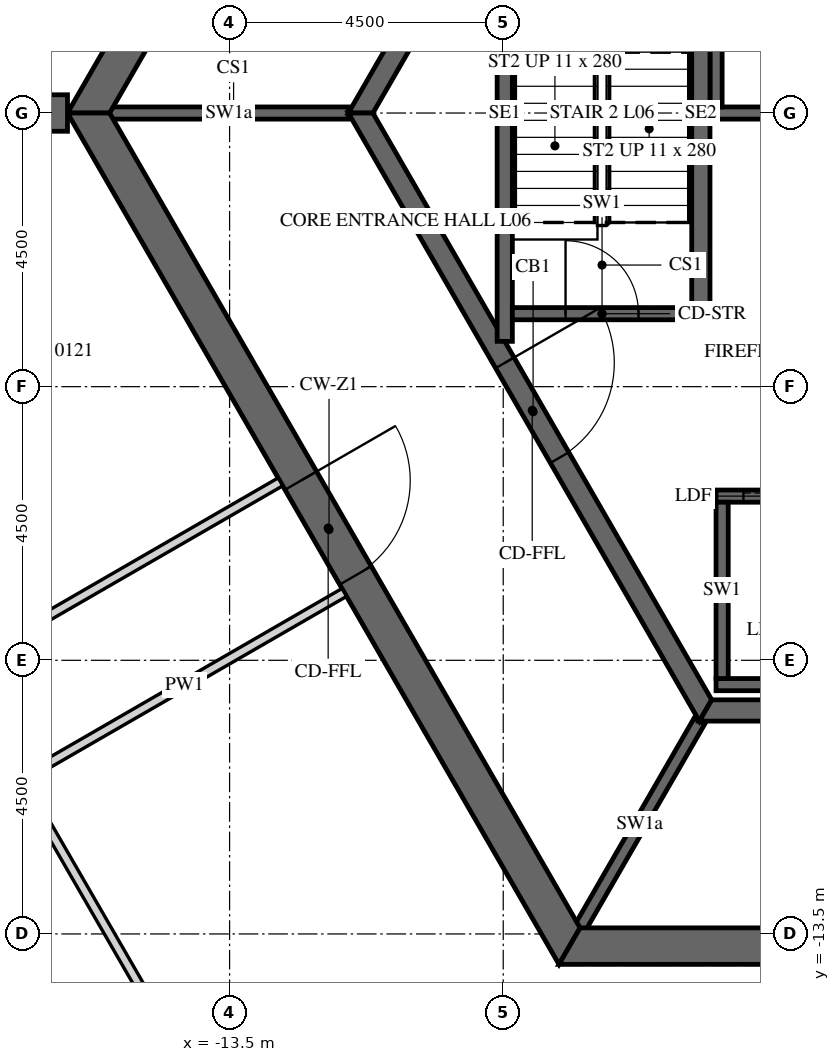
"""IFC4 building model, lengths in metres.
Left out: names, types, materials, properties, quantities, classifications, styles, units other than length and angle.
Written with IfcOpenShell. Run it as: python <this file> out.ifc"""

import sys

from ifc_helpers import new_model, si_unit, direction, frame, frame_2d, origin, place, context, subcontext, project, spatial, polyline, rectangle, outline, extrude, element, fill, save


model = new_model("IFC4")
c1 = context("Model", 3, precision=1e-05, world=origin(), true_north=direction((0.0, 1.0)))
c2 = subcontext(c1, "Body", "Model", "MODEL_VIEW")
j1 = project(units=[si_unit("LENGTHUNIT", "METRE"), si_unit("PLANEANGLEUNIT", "RADIAN")], contexts=[c1])
p1 = place(None, origin())
s1 = spatial("IfcSite", under=j1, at=p1, CompositionType="ELEMENT")
p2 = place(p1, origin())
s2 = spatial("IfcBuilding", under=s1, at=p2, CompositionType="ELEMENT")
p3 = place(p2, frame((0.0, 0.0, 37.5)))
s3 = spatial("IfcBuildingStorey", under=s2, at=p3, CompositionType="ELEMENT", Elevation=37.5)
p4 = place(p3, frame((-7.91, 13.7, -0.15), z_axis=(0.0, 0.0, 1.0), x_axis=(-0.499999880136, -0.866025472988, 0.0)))
e1 = element("IfcWall", 1, at=p4, inside=s3, PredefinedType="SHEAR", context=c2, shape_type="SweptSolid", body=[
    extrude(outline(polyline([(-0.173, -0.3), (15.993, -0.3), (15.646, 0.3), (0.173, 0.3), (-0.173, -0.3)])), origin(), (0.0, 0.0, 1.0), 3.9),
])
p5 = place(p4, frame((7.039, 0.0, 0.15)))
e2 = element("IfcOpeningElement", 2, at=p5, cuts=e1, PredefinedType="OPENING", context=c2, shape_type="SweptSolid", body=[
    extrude(rectangle(XDim=1.8, YDim=2.4, at=frame_2d((0.9, 1.2))), frame((0.0, 0.31, 0.0), z_axis=(0.0, -1.0, 0.0), x_axis=(1.0, 0.0, 0.0)), (0.0, 0.0, 1.0), 0.62),
])
p6 = place(p3, frame((-15.819, 0.0, -0.15), z_axis=(0.0, 0.0, 1.0), x_axis=(0.499999880136, -0.866025472988, 0.0)))
e3 = element("IfcWall", 3, at=p6, inside=s3, PredefinedType="SHEAR", context=c2, shape_type="SweptSolid", body=[
    extrude(outline(polyline([(-0.173, -0.3), (15.993, -0.3), (15.646, 0.3), (0.173, 0.3), (-0.173, -0.3)])), origin(), (0.0, 0.0, 1.0), 3.9),
])
p7 = place(p6, frame((6.981, 0.0, 0.15)))
e4 = element("IfcOpeningElement", 4, at=p7, cuts=e3, PredefinedType="OPENING", context=c2, shape_type="SweptSolid", body=[
    extrude(rectangle(XDim=1.8, YDim=2.4, at=frame_2d((0.9, 1.2))), frame((0.0, 0.31, 0.0), z_axis=(0.0, -1.0, 0.0), x_axis=(1.0, 0.0, 0.0)), (0.0, 0.0, 1.0), 0.62),
])
p8 = place(p3, frame((-7.91, -13.7, -0.15), z_axis=(0.0, 0.0, 1.0), x_axis=(1.0, 0.0, 0.0)))
e5 = element("IfcWall", 5, at=p8, inside=s3, PredefinedType="SHEAR", context=c2, shape_type="SweptSolid", body=[
    extrude(outline(polyline([(-0.173, -0.3), (15.993, -0.3), (15.646, 0.3), (0.173, 0.3), (-0.173, -0.3)])), origin(), (0.0, 0.0, 1.0), 3.9),
])
p9 = place(p8, frame((7.31, 0.0, 0.15)))
e6 = element("IfcOpeningElement", 6, at=p9, cuts=e5, PredefinedType="OPENING", context=c2, shape_type="SweptSolid", body=[
    extrude(rectangle(XDim=1.2, YDim=2.4, at=frame_2d((0.6, 1.2))), frame((0.0, 0.31, 0.0), z_axis=(0.0, -1.0, 0.0), x_axis=(1.0, 0.0, 0.0)), (0.0, 0.0, 1.0), 0.62),
])
p10 = place(p3, frame((-16.166, 0.0, -0.15), z_axis=(0.0, 0.0, 1.0), x_axis=(-1.0, 0.0, 0.0)))
e7 = element("IfcWall", 7, at=p10, inside=s3, PredefinedType="SHEAR", context=c2, shape_type="SweptSolid", body=[
    extrude(rectangle(XDim=16.509, YDim=0.6, at=frame_2d((8.254, 0.0))), origin(), (0.0, 0.0, 1.0), 3.9),
])
p11 = place(p10, frame((7.354, 0.0, 0.15)))
e8 = element("IfcOpeningElement", 8, at=p11, cuts=e7, PredefinedType="OPENING", context=c2, shape_type="SweptSolid", body=[
    extrude(rectangle(XDim=1.8, YDim=2.4, at=frame_2d((0.9, 1.2))), frame((0.0, 0.31, 0.0), z_axis=(0.0, -1.0, 0.0), x_axis=(1.0, 0.0, 0.0)), (0.0, 0.0, 1.0), 0.62),
])
p12 = place(p3, frame((-5.673, 9.825, -0.15), z_axis=(0.0, 0.0, 1.0), x_axis=(-0.499995046907, -0.866028263435, 0.0)))
e9 = element("IfcWall", 9, at=p12, inside=s3, PredefinedType="SHEAR", context=c2, shape_type="SweptSolid", body=[
    extrude(outline(polyline([(-0.101, -0.175), (11.446, -0.175), (11.244, 0.175), (0.101, 0.175), (-0.101, -0.175)])), origin(), (0.0, 0.0, 1.0), 3.9),
])
p13 = place(p12, frame((4.801, 0.0, 0.15)))
e10 = element("IfcOpeningElement", 10, at=p13, cuts=e9, PredefinedType="OPENING", context=c2, shape_type="SweptSolid", body=[
    extrude(rectangle(XDim=1.8, YDim=2.4, at=frame_2d((0.9, 1.2))), frame((0.0, 0.185, 0.0), z_axis=(0.0, -1.0, 0.0), x_axis=(1.0, 0.0, 0.0)), (0.0, 0.0, 1.0), 0.37),
])
p14 = place(p3, frame((-11.345, 0.0, -0.15), z_axis=(0.0, 0.0, 1.0), x_axis=(0.499995046907, -0.866028263435, 0.0)))
e11 = element("IfcWall", 11, at=p14, inside=s3, PredefinedType="SHEAR", context=c2, shape_type="SweptSolid", body=[
    extrude(outline(polyline([(-0.101, -0.175), (11.446, -0.175), (11.244, 0.175), (0.101, 0.175), (-0.101, -0.175)])), origin(), (0.0, 0.0, 1.0), 3.9),
])
p15 = place(p14, frame((4.744, 0.0, 0.15)))
e12 = element("IfcOpeningElement", 12, at=p15, cuts=e11, PredefinedType="OPENING", context=c2, shape_type="SweptSolid", body=[
    extrude(rectangle(XDim=1.8, YDim=2.4, at=frame_2d((0.9, 1.2))), frame((0.0, 0.185, 0.0), z_axis=(0.0, -1.0, 0.0), x_axis=(1.0, 0.0, 0.0)), (0.0, 0.0, 1.0), 0.37),
])
p16 = place(p3, frame((-5.673, -9.825, -0.15), z_axis=(0.0, 0.0, 1.0), x_axis=(1.0, 0.0, 0.0)))
e13 = element("IfcWall", 13, at=p16, inside=s3, PredefinedType="SHEAR", context=c2, shape_type="SweptSolid", body=[
    extrude(outline(polyline([(-0.101, -0.175), (11.446, -0.175), (11.244, 0.175), (0.101, 0.175), (-0.101, -0.175)])), origin(), (0.0, 0.0, 1.0), 3.9),
])
p17 = place(p3, frame((-5.6, 0.0, -0.25), z_axis=(0.0, 0.0, 1.0), x_axis=(1.0, 0.0, 0.0)))
e14 = element("IfcWall", 14, at=p17, inside=s3, PredefinedType="SHEAR", context=c2, shape_type="SweptSolid", body=[
    extrude(rectangle(XDim=11.2, YDim=0.2, at=frame_2d((5.6, 0.0))), origin(), (0.0, 0.0, 1.0), 3.9),
])
p18 = place(p3, frame((-5.5, 0.1, -0.25), z_axis=(0.0, 0.0, 1.0), x_axis=(0.0, 1.0, 0.0)))
e15 = element("IfcWall", 15, at=p18, inside=s3, PredefinedType="SHEAR", context=c2, shape_type="SweptSolid", body=[
    extrude(rectangle(XDim=3.1, YDim=0.2, at=frame_2d((1.55, 0.0))), origin(), (0.0, 0.0, 1.0), 3.9),
])
p19 = place(p3, frame((-5.5, -6.3, -0.25), z_axis=(0.0, 0.0, 1.0), x_axis=(1.0, 0.0, 0.0)))
e16 = element("IfcWall", 16, at=p19, inside=s3, PredefinedType="SHEAR", context=c2, shape_type="SweptSolid", body=[
    extrude(rectangle(XDim=9.2, YDim=0.2, at=frame_2d((4.6, 0.0))), origin(), (0.0, 0.0, 1.0), 3.9),
])
p20 = place(p19, frame((0.45, 0.0, 0.25)))
e17 = element("IfcOpeningElement", 17, at=p20, cuts=e16, PredefinedType="OPENING", context=c2, shape_type="SweptSolid", body=[
    extrude(rectangle(XDim=1.1, YDim=2.1, at=frame_2d((0.55, 1.05))), frame((0.0, 0.11, 0.0), z_axis=(0.0, -1.0, 0.0), x_axis=(1.0, 0.0, 0.0)), (0.0, 0.0, 1.0), 0.22),
])
p21 = place(p19, frame((2.25, 0.0, 0.25)))
e18 = element("IfcOpeningElement", 18, at=p21, cuts=e16, PredefinedType="OPENING", context=c2, shape_type="SweptSolid", body=[
    extrude(rectangle(XDim=1.1, YDim=2.1, at=frame_2d((0.55, 1.05))), frame((0.0, 0.11, 0.0), z_axis=(0.0, -1.0, 0.0), x_axis=(1.0, 0.0, 0.0)), (0.0, 0.0, 1.0), 0.22),
])
p22 = place(p19, frame((4.05, 0.0, 0.25)))
e19 = element("IfcOpeningElement", 19, at=p22, cuts=e16, PredefinedType="OPENING", context=c2, shape_type="SweptSolid", body=[
    extrude(rectangle(XDim=1.1, YDim=2.1, at=frame_2d((0.55, 1.05))), frame((0.0, 0.11, 0.0), z_axis=(0.0, -1.0, 0.0), x_axis=(1.0, 0.0, 0.0)), (0.0, 0.0, 1.0), 0.22),
])
p23 = place(p19, frame((5.85, 0.0, 0.25)))
e20 = element("IfcOpeningElement", 20, at=p23, cuts=e16, PredefinedType="OPENING", context=c2, shape_type="SweptSolid", body=[
    extrude(rectangle(XDim=1.1, YDim=2.1, at=frame_2d((0.55, 1.05))), frame((0.0, 0.11, 0.0), z_axis=(0.0, -1.0, 0.0), x_axis=(1.0, 0.0, 0.0)), (0.0, 0.0, 1.0), 0.22),
])
p24 = place(p19, frame((7.65, 0.0, 0.25)))
e21 = element("IfcOpeningElement", 21, at=p24, cuts=e16, PredefinedType="OPENING", context=c2, shape_type="SweptSolid", body=[
    extrude(rectangle(XDim=1.1, YDim=2.1, at=frame_2d((0.55, 1.05))), frame((0.0, 0.11, 0.0), z_axis=(0.0, -1.0, 0.0), x_axis=(1.0, 0.0, 0.0)), (0.0, 0.0, 1.0), 0.22),
])
p25 = place(p3, frame((-5.5, -9.4, -0.25), z_axis=(0.0, 0.0, 1.0), x_axis=(1.0, 0.0, 0.0)))
e22 = element("IfcWall", 22, at=p25, inside=s3, PredefinedType="SHEAR", context=c2, shape_type="SweptSolid", body=[
    extrude(rectangle(XDim=9.2, YDim=0.2, at=frame_2d((4.6, 0.0))), origin(), (0.0, 0.0, 1.0), 3.9),
])
p26 = place(p3, frame((-5.4, -9.3, -0.25), z_axis=(0.0, 0.0, 1.0), x_axis=(0.0, 1.0, 0.0)))
e23 = element("IfcWall", 23, at=p26, inside=s3, PredefinedType="SHEAR", context=c2, shape_type="SweptSolid", body=[
    extrude(rectangle(XDim=2.9, YDim=0.2, at=frame_2d((1.45, 0.0))), origin(), (0.0, 0.0, 1.0), 3.9),
])
p27 = place(p3, frame((-11.547, 0.0, -0.15), z_axis=(0.0, 0.0, 1.0), x_axis=(-1.0, 0.0, 0.0)))
e24 = element("IfcWall", 24, at=p27, inside=s3, PredefinedType="SHEAR", context=c2, shape_type="SweptSolid", body=[
    extrude(rectangle(XDim=3.926, YDim=0.2, at=frame_2d((1.963, 0.0))), origin(), (0.0, 0.0, 1.0), 3.9),
])
p28 = place(p3, frame((-5.773, -10.0, -0.15), z_axis=(0.0, 0.0, 1.0), x_axis=(-0.500038251005, -0.86600331843, 0.0)))
e25 = element("IfcWall", 25, at=p28, inside=s3, PredefinedType="SHEAR", context=c2, shape_type="SweptSolid", body=[
    extrude(rectangle(XDim=3.926, YDim=0.2, at=frame_2d((1.963, 0.0))), origin(), (0.0, 0.0, 1.0), 3.9),
])
p29 = place(p3, frame((-5.75, -3.4, -0.25), z_axis=(0.0, 0.0, 1.0), x_axis=(0.0, 1.0, 0.0)))
e26 = element("IfcWall", 26, at=p29, inside=s3, PredefinedType="SHEAR", context=c2, shape_type="SweptSolid", body=[
    extrude(rectangle(XDim=6.8, YDim=0.3, at=frame_2d((3.4, 0.0))), origin(), (0.0, 0.0, 1.0), 3.9),
])
p30 = place(p3, frame((-8.975, -3.755, -0.25), z_axis=(0.0, 0.0, 1.0), x_axis=(0.0, 1.0, 0.0)))
e27 = element("IfcWall", 27, at=p30, inside=s3, PredefinedType="SHEAR", context=c2, shape_type="SweptSolid", body=[
    extrude(rectangle(XDim=7.51, YDim=0.25, at=frame_2d((3.755, 0.0))), origin(), (0.0, 0.0, 1.0), 3.9),
])
p31 = place(p3, frame((-8.85, -3.3, -0.25), z_axis=(0.0, 0.0, 1.0), x_axis=(1.0, 0.0, 0.0)))
e28 = element("IfcWall", 28, at=p31, inside=s3, PredefinedType="SHEAR", context=c2, shape_type="SweptSolid", body=[
    extrude(rectangle(XDim=2.95, YDim=0.2, at=frame_2d((1.475, 0.0))), origin(), (0.0, 0.0, 1.0), 3.9),
])
p32 = place(p31, frame((0.875, 0.0, 0.25)))
e29 = element("IfcOpeningElement", 29, at=p32, cuts=e28, PredefinedType="OPENING", context=c2, shape_type="SweptSolid", body=[
    extrude(rectangle(XDim=1.2, YDim=2.4, at=frame_2d((0.6, 1.2))), frame((0.0, 0.11, 0.0), z_axis=(0.0, -1.0, 0.0), x_axis=(1.0, 0.0, 0.0)), (0.0, 0.0, 1.0), 0.22),
])
p33 = place(p3, frame((-24.09, -2.175, 0.0), z_axis=(0.0, 0.0, 1.0), x_axis=(0.499996832073, -0.86602723278, 0.0)))
e30 = element("IfcWall", 30, at=p33, inside=s3, PredefinedType="PARTITIONING", context=c2, shape_type="SweptSolid", body=[
    extrude(rectangle(XDim=23.877, YDim=0.15, at=frame_2d((11.938, 0.0))), origin(), (0.0, 0.0, 1.0), 2.988),
])
p34 = place(p33, frame((4.543, 0.0, 0.0)))
e31 = element("IfcOpeningElement", 31, at=p34, cuts=e30, PredefinedType="OPENING", context=c2, shape_type="SweptSolid", body=[
    extrude(rectangle(XDim=1.0, YDim=2.1, at=frame_2d((0.5, 1.05))), frame((0.0, 0.085, 0.0), z_axis=(0.0, -1.0, 0.0), x_axis=(1.0, 0.0, 0.0)), (0.0, 0.0, 1.0), 0.17),
])
p35 = place(p33, frame((11.372, 0.0, 0.0)))
e32 = element("IfcOpeningElement", 32, at=p35, cuts=e30, PredefinedType="OPENING", context=c2, shape_type="SweptSolid", body=[
    extrude(rectangle(XDim=1.0, YDim=2.1, at=frame_2d((0.5, 1.05))), frame((0.0, 0.085, 0.0), z_axis=(0.0, -1.0, 0.0), x_axis=(1.0, 0.0, 0.0)), (0.0, 0.0, 1.0), 0.17),
])
p36 = place(p33, frame((19.425, 0.0, 0.0)))
e33 = element("IfcOpeningElement", 33, at=p36, cuts=e30, PredefinedType="OPENING", context=c2, shape_type="SweptSolid", body=[
    extrude(rectangle(XDim=1.0, YDim=2.1, at=frame_2d((0.5, 1.05))), frame((0.0, 0.085, 0.0), z_axis=(0.0, -1.0, 0.0), x_axis=(1.0, 0.0, 0.0)), (0.0, 0.0, 1.0), 0.17),
])
p37 = place(p3, frame((-12.664, -6.066, 0.0), z_axis=(0.0, 0.0, 1.0), x_axis=(-0.866023618125, -0.500003092839, 0.0)))
e34 = element("IfcWall", 34, at=p37, inside=s3, PredefinedType="PARTITIONING", context=c2, shape_type="SweptSolid", body=[
    extrude(rectangle(XDim=6.15, YDim=0.15, at=frame_2d((3.075, 0.0))), origin(), (0.0, 0.0, 1.0), 2.988),
])
p38 = place(p3, frame((-11.197, -20.907, 0.0), z_axis=(0.0, 0.0, 1.0), x_axis=(-0.500004557924, 0.86602277225, 0.0)))
e35 = element("IfcWall", 35, at=p38, inside=s3, PredefinedType="PARTITIONING", context=c2, shape_type="SweptSolid", body=[
    extrude(rectangle(XDim=11.487, YDim=0.15, at=frame_2d((5.743, 0.0))), origin(), (0.0, 0.0, 1.0), 2.988),
])
p39 = place(p38, frame((5.293, 0.0, 0.0)))
e36 = element("IfcOpeningElement", 36, at=p39, cuts=e35, PredefinedType="OPENING", context=c2, shape_type="SweptSolid", body=[
    extrude(rectangle(XDim=0.9, YDim=2.1, at=frame_2d((0.45, 1.05))), frame((0.0, 0.085, 0.0), z_axis=(0.0, -1.0, 0.0), x_axis=(1.0, 0.0, 0.0)), (0.0, 0.0, 1.0), 0.17),
])
p40 = place(p3, frame((-16.875, -10.922, 0.0), z_axis=(0.0, 0.0, 1.0), x_axis=(0.866023634079, 0.500003065207, 0.0)))
e37 = element("IfcWall", 37, at=p40, inside=s3, PredefinedType="PARTITIONING", context=c2, shape_type="SweptSolid", body=[
    extrude(rectangle(XDim=6.075, YDim=0.15, at=frame_2d((3.038, 0.0))), origin(), (0.0, 0.0, 1.0), 2.988),
])
p41 = place(p7, origin())
e38 = element("IfcDoor", 38, at=p41, inside=s3, OperationType="DOUBLE_DOOR_SINGLE_SWING", PredefinedType="DOOR", context=c2, shape_type="SweptSolid", body=[
    extrude(rectangle(XDim=1.8, YDim=2.4, at=frame_2d((0.9, 1.2))), frame((0.0, 0.025, 0.0), z_axis=(0.0, -1.0, 0.0), x_axis=(1.0, 0.0, 0.0)), (0.0, 0.0, 1.0), 0.05),
])
fill(e4, e38)
p42 = place(p15, origin())
e39 = element("IfcDoor", 39, at=p42, inside=s3, OperationType="DOUBLE_DOOR_SINGLE_SWING", PredefinedType="DOOR", context=c2, shape_type="SweptSolid", body=[
    extrude(rectangle(XDim=1.8, YDim=2.4, at=frame_2d((0.9, 1.2))), frame((0.0, 0.025, 0.0), z_axis=(0.0, -1.0, 0.0), x_axis=(1.0, 0.0, 0.0)), (0.0, 0.0, 1.0), 0.05),
])
fill(e12, e39)
p43 = place(p32, origin())
e40 = element("IfcDoor", 40, at=p43, inside=s3, OperationType="SINGLE_SWING_LEFT", PredefinedType="DOOR", context=c2, shape_type="SweptSolid", body=[
    extrude(rectangle(XDim=1.2, YDim=2.4, at=frame_2d((0.6, 1.2))), frame((0.0, 0.025, 0.0), z_axis=(0.0, -1.0, 0.0), x_axis=(1.0, 0.0, 0.0)), (0.0, 0.0, 1.0), 0.05),
])
fill(e29, e40)
p44 = place(p20, origin())
e41 = element("IfcDoor", 41, at=p44, inside=s3, OperationType="SLIDING_TO_LEFT", PredefinedType="DOOR", context=c2, shape_type="SweptSolid", body=[
    extrude(rectangle(XDim=1.1, YDim=2.1, at=frame_2d((0.55, 1.05))), frame((0.0, 0.025, 0.0), z_axis=(0.0, -1.0, 0.0), x_axis=(1.0, 0.0, 0.0)), (0.0, 0.0, 1.0), 0.05),
])
fill(e17, e41)
save(model, sys.argv[1])
